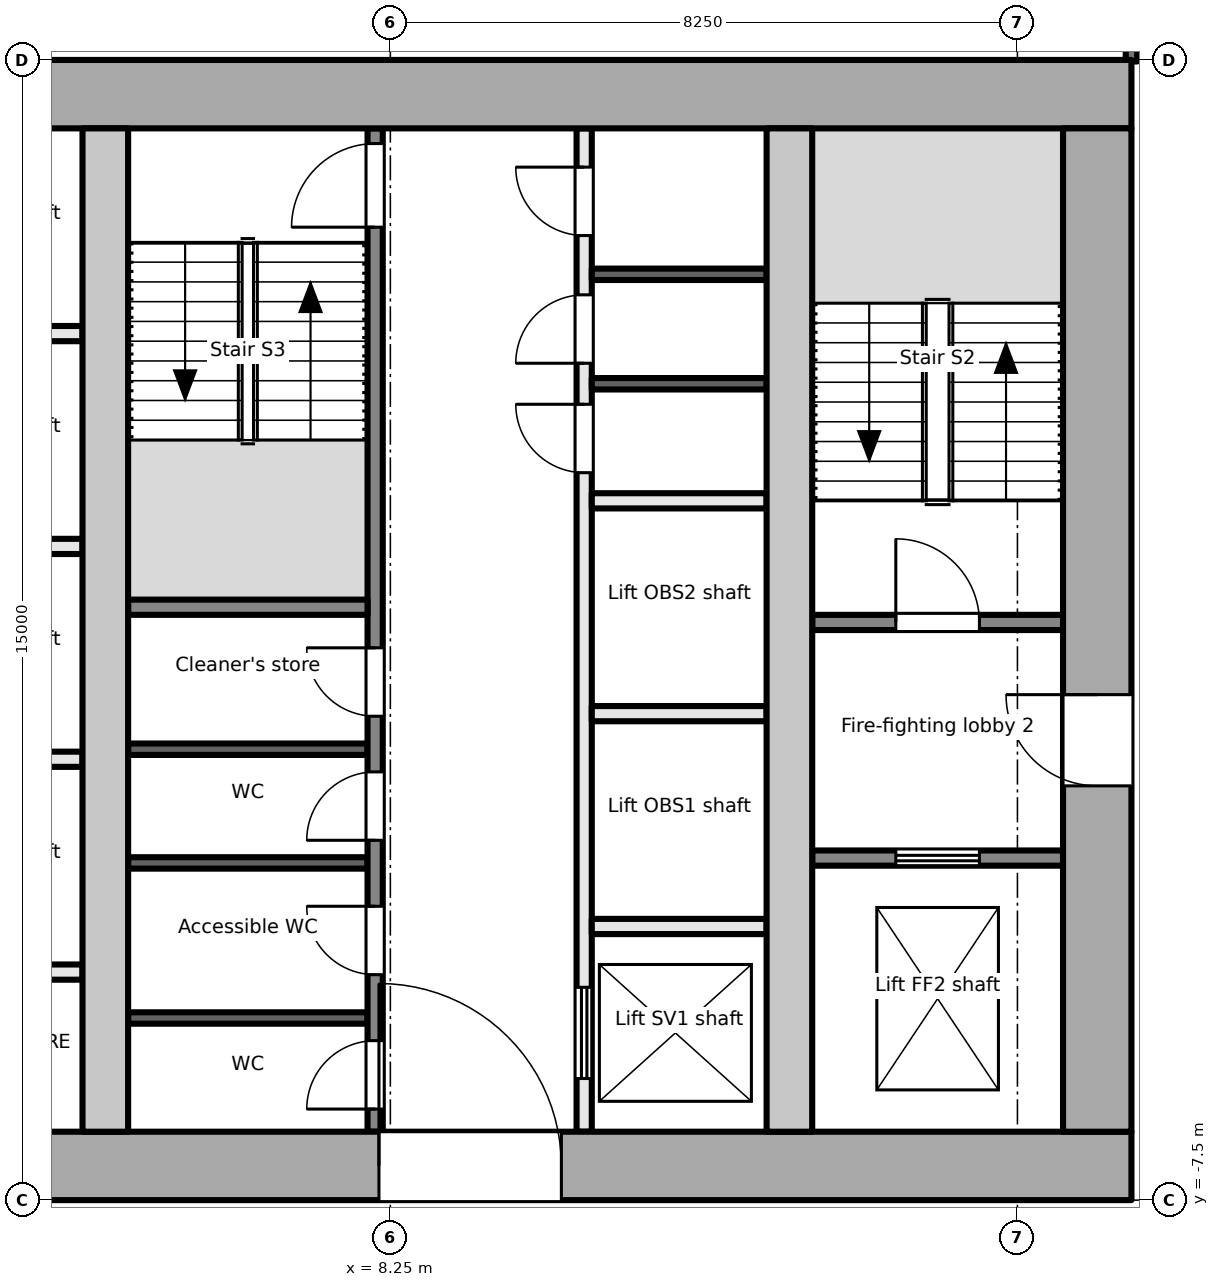
"""IFC4 building model, lengths in metres.
Left out: names, types, materials, properties, quantities, classifications, styles, units other than length and angle.
Written with IfcOpenShell. Run it as: python <this file> out.ifc"""

import sys

from ifc_helpers import new_model, si_unit, direction, frame, frame_2d, origin, place, context, subcontext, project, spatial, rectangle, extrude, element, fill, save


model = new_model("IFC4")
c1 = context("Model", 3, precision=1e-05, world=origin(), true_north=direction((0.0, 1.0)))
c2 = subcontext(c1, "Body", "Model", "MODEL_VIEW")
j1 = project(units=[si_unit("LENGTHUNIT", "METRE"), si_unit("PLANEANGLEUNIT", "RADIAN")], contexts=[c1])
p1 = place(None, origin())
s1 = spatial("IfcSite", under=j1, at=p1, CompositionType="ELEMENT")
p2 = place(p1, origin())
s2 = spatial("IfcBuilding", under=s1, at=p2, CompositionType="ELEMENT")
p3 = place(p2, frame((0.0, 0.0, 61.1)))
s3 = spatial("IfcBuildingStorey", under=s2, at=p3, CompositionType="ELEMENT", Elevation=61.1)
p4 = place(p3, frame((-18.0, -7.05, -0.2), z_axis=(0.0, 0.0, 1.0), x_axis=(1.0, 0.0, 0.0)))
e1 = element("IfcWall", 1, at=p4, inside=s3, PredefinedType="SHEAR", context=c2, shape_type="SweptSolid", body=[
    extrude(rectangle(XDim=36.0, YDim=0.9, at=frame_2d((18.0, 0.0))), origin(), (0.0, 0.0, 1.0), 4.1),
])
p5 = place(p4, frame((7.8, 0.0, 0.2)))
e2 = element("IfcOpeningElement", 2, at=p5, cuts=e1, PredefinedType="OPENING", context=c2, shape_type="SweptSolid", body=[
    extrude(rectangle(XDim=2.4, YDim=2.1, at=frame_2d((1.2, 1.05))), frame((0.0, 0.46, 0.0), z_axis=(0.0, -1.0, 0.0), x_axis=(1.0, 0.0, 0.0)), (0.0, 0.0, 1.0), 0.921),
])
p6 = place(p4, frame((17.4, 0.0, 0.2)))
e3 = element("IfcOpeningElement", 3, at=p6, cuts=e1, PredefinedType="OPENING", context=c2, shape_type="SweptSolid", body=[
    extrude(rectangle(XDim=1.2, YDim=2.1, at=frame_2d((0.6, 1.05))), frame((0.0, 0.46, 0.0), z_axis=(0.0, -1.0, 0.0), x_axis=(1.0, 0.0, 0.0)), (0.0, 0.0, 1.0), 0.921),
])
p7 = place(p4, frame((26.1, 0.0, 0.2)))
e4 = element("IfcOpeningElement", 4, at=p7, cuts=e1, PredefinedType="OPENING", context=c2, shape_type="SweptSolid", body=[
    extrude(rectangle(XDim=2.4, YDim=2.1, at=frame_2d((1.2, 1.05))), frame((0.0, 0.46, 0.0), z_axis=(0.0, -1.0, 0.0), x_axis=(1.0, 0.0, 0.0)), (0.0, 0.0, 1.0), 0.921),
])
p8 = place(p3, frame((-18.0, 7.05, -0.2), z_axis=(0.0, 0.0, 1.0), x_axis=(1.0, 0.0, 0.0)))
e5 = element("IfcWall", 5, at=p8, inside=s3, PredefinedType="SHEAR", context=c2, shape_type="SweptSolid", body=[
    extrude(rectangle(XDim=36.0, YDim=0.9, at=frame_2d((18.0, 0.0))), origin(), (0.0, 0.0, 1.0), 4.1),
])
p9 = place(p3, frame((17.55, -6.6, -0.2), z_axis=(0.0, 0.0, 1.0), x_axis=(0.0, 1.0, 0.0)))
e6 = element("IfcWall", 6, at=p9, inside=s3, PredefinedType="SHEAR", context=c2, shape_type="SweptSolid", body=[
    extrude(rectangle(XDim=13.2, YDim=0.9, at=frame_2d((6.6, 0.0))), origin(), (0.0, 0.0, 1.0), 4.1),
])
p10 = place(p9, frame((4.55, 0.0, 0.2)))
e7 = element("IfcOpeningElement", 7, at=p10, cuts=e6, PredefinedType="OPENING", context=c2, shape_type="SweptSolid", body=[
    extrude(rectangle(XDim=1.2, YDim=2.1, at=frame_2d((0.6, 1.05))), frame((0.0, 0.46, 0.0), z_axis=(0.0, -1.0, 0.0), x_axis=(1.0, 0.0, 0.0)), (0.0, 0.0, 1.0), 0.921),
])
for number, where, z_axis, x_axis in (
    (8, (4.5, -6.6, -0.2), (0.0, 0.0, 1.0), (0.0, 1.0, 0.0)),
    (9, (13.5, -6.6, -0.2), (0.0, 0.0, 1.0), (0.0, 1.0, 0.0)),
):
    element("IfcWall", number, at=place(p3, frame(where, z_axis=z_axis, x_axis=x_axis)), inside=s3, PredefinedType="SHEAR", context=c2, shape_type="SweptSolid", body=[
        extrude(rectangle(XDim=13.2, YDim=0.6, at=frame_2d((6.6, 0.0))), origin(), (0.0, 0.0, 1.0), 4.1),
    ])
p11 = place(p3, frame((13.8, -3.0, 0.0), z_axis=(0.0, 0.0, 1.0), x_axis=(1.0, 0.0, 0.0)))
e10 = element("IfcWall", 10, at=p11, inside=s3, PredefinedType="PARTITIONING", context=c2, shape_type="SweptSolid", body=[
    extrude(rectangle(XDim=3.3, YDim=0.2, at=frame_2d((1.65, 0.0))), origin(), (0.0, 0.0, 1.0), 3.9),
])
p12 = place(p11, frame((1.1, 0.0, 0.0)))
e11 = element("IfcOpeningElement", 11, at=p12, cuts=e10, PredefinedType="OPENING", context=c2, shape_type="SweptSolid", body=[
    extrude(rectangle(XDim=1.1, YDim=2.1, at=frame_2d((0.55, 1.05))), frame((0.0, 0.111, 0.0), z_axis=(0.0, -1.0, 0.0), x_axis=(1.0, 0.0, 0.0)), (0.0, 0.0, 1.0), 0.221),
])
p13 = place(p3, frame((13.8, 0.1, 0.0), z_axis=(0.0, 0.0, 1.0), x_axis=(1.0, 0.0, 0.0)))
e12 = element("IfcWall", 12, at=p13, inside=s3, PredefinedType="PARTITIONING", context=c2, shape_type="SweptSolid", body=[
    extrude(rectangle(XDim=3.3, YDim=0.2, at=frame_2d((1.65, 0.0))), origin(), (0.0, 0.0, 1.0), 3.9),
])
p14 = place(p13, frame((1.1, 0.0, 0.0)))
e13 = element("IfcOpeningElement", 13, at=p14, cuts=e12, PredefinedType="OPENING", context=c2, shape_type="SweptSolid", body=[
    extrude(rectangle(XDim=1.1, YDim=2.1, at=frame_2d((0.55, 1.05))), frame((0.0, 0.111, 0.0), z_axis=(0.0, -1.0, 0.0), x_axis=(1.0, 0.0, 0.0)), (0.0, 0.0, 1.0), 0.221),
])
for number, where, z_axis, x_axis in (
    (14, (1.9, -1.7, 0.0), (0.0, 0.0, 1.0), (1.0, 0.0, 0.0)),
    (15, (1.9, 1.1, 0.0), (0.0, 0.0, 1.0), (1.0, 0.0, 0.0)),
    (16, (1.9, 3.9, 0.0), (0.0, 0.0, 1.0), (1.0, 0.0, 0.0)),
    (17, (1.9, -4.5, 0.0), (0.0, 0.0, 1.0), (1.0, 0.0, 0.0)),
):
    element("IfcWall", number, at=place(p3, frame(where, z_axis=z_axis, x_axis=x_axis)), inside=s3, PredefinedType="PARTITIONING", context=c2, shape_type="SweptSolid", body=[
        extrude(rectangle(XDim=2.3, YDim=0.2, at=frame_2d((1.15, 0.0))), origin(), (0.0, 0.0, 1.0), 3.9),
    ])
p15 = place(p3, frame((8.05, -6.6, 0.0), z_axis=(0.0, 0.0, 1.0), x_axis=(0.0, 1.0, 0.0)))
e18 = element("IfcWall", 18, at=p15, inside=s3, PredefinedType="PARTITIONING", context=c2, shape_type="SweptSolid", body=[
    extrude(rectangle(XDim=13.2, YDim=0.2, at=frame_2d((6.6, 0.0))), origin(), (0.0, 0.0, 1.0), 3.9),
])
p16 = place(p15, frame((0.298, 0.0, 0.0)))
e19 = element("IfcOpeningElement", 19, at=p16, cuts=e18, PredefinedType="OPENING", context=c2, shape_type="SweptSolid", body=[
    extrude(rectangle(XDim=0.9, YDim=2.1, at=frame_2d((0.45, 1.05))), frame((0.0, 0.111, 0.0), z_axis=(0.0, -1.0, 0.0), x_axis=(1.0, 0.0, 0.0)), (0.0, 0.0, 1.0), 0.221),
])
p17 = place(p15, frame((2.066, 0.0, 0.0)))
e20 = element("IfcOpeningElement", 20, at=p17, cuts=e18, PredefinedType="OPENING", context=c2, shape_type="SweptSolid", body=[
    extrude(rectangle(XDim=0.9, YDim=2.1, at=frame_2d((0.45, 1.05))), frame((0.0, 0.111, 0.0), z_axis=(0.0, -1.0, 0.0), x_axis=(1.0, 0.0, 0.0)), (0.0, 0.0, 1.0), 0.221),
])
p18 = place(p15, frame((3.834, 0.0, 0.0)))
e21 = element("IfcOpeningElement", 21, at=p18, cuts=e18, PredefinedType="OPENING", context=c2, shape_type="SweptSolid", body=[
    extrude(rectangle(XDim=0.9, YDim=2.1, at=frame_2d((0.45, 1.05))), frame((0.0, 0.111, 0.0), z_axis=(0.0, -1.0, 0.0), x_axis=(1.0, 0.0, 0.0)), (0.0, 0.0, 1.0), 0.221),
])
p19 = place(p15, frame((5.466, 0.0, 0.0)))
e22 = element("IfcOpeningElement", 22, at=p19, cuts=e18, PredefinedType="OPENING", context=c2, shape_type="SweptSolid", body=[
    extrude(rectangle(XDim=0.9, YDim=2.1, at=frame_2d((0.45, 1.05))), frame((0.0, 0.111, 0.0), z_axis=(0.0, -1.0, 0.0), x_axis=(1.0, 0.0, 0.0)), (0.0, 0.0, 1.0), 0.221),
])
p20 = place(p15, frame((11.9, 0.0, 0.0)))
e23 = element("IfcOpeningElement", 23, at=p20, cuts=e18, PredefinedType="OPENING", context=c2, shape_type="SweptSolid", body=[
    extrude(rectangle(XDim=1.1, YDim=2.1, at=frame_2d((0.55, 1.05))), frame((0.0, 0.111, 0.0), z_axis=(0.0, -1.0, 0.0), x_axis=(1.0, 0.0, 0.0)), (0.0, 0.0, 1.0), 0.221),
])
p21 = place(p3, frame((10.8, -6.6, 0.0), z_axis=(0.0, 0.0, 1.0), x_axis=(0.0, 1.0, 0.0)))
e24 = element("IfcWall", 24, at=p21, inside=s3, PredefinedType="PARTITIONING", context=c2, shape_type="SweptSolid", body=[
    extrude(rectangle(XDim=13.2, YDim=0.2, at=frame_2d((6.6, 0.0))), origin(), (0.0, 0.0, 1.0), 3.9),
])
p22 = place(p21, frame((0.7, 0.0, 0.0)))
e25 = element("IfcOpeningElement", 25, at=p22, cuts=e24, PredefinedType="OPENING", context=c2, shape_type="SweptSolid", body=[
    extrude(rectangle(XDim=1.2, YDim=2.1, at=frame_2d((0.6, 1.05))), frame((0.0, 0.111, 0.0), z_axis=(0.0, -1.0, 0.0), x_axis=(1.0, 0.0, 0.0)), (0.0, 0.0, 1.0), 0.221),
])
p23 = place(p21, frame((8.67, 0.0, 0.0)))
e26 = element("IfcOpeningElement", 26, at=p23, cuts=e24, PredefinedType="OPENING", context=c2, shape_type="SweptSolid", body=[
    extrude(rectangle(XDim=0.9, YDim=2.1, at=frame_2d((0.45, 1.05))), frame((0.0, 0.111, 0.0), z_axis=(0.0, -1.0, 0.0), x_axis=(1.0, 0.0, 0.0)), (0.0, 0.0, 1.0), 0.221),
])
p24 = place(p21, frame((10.11, 0.0, 0.0)))
e27 = element("IfcOpeningElement", 27, at=p24, cuts=e24, PredefinedType="OPENING", context=c2, shape_type="SweptSolid", body=[
    extrude(rectangle(XDim=0.9, YDim=2.1, at=frame_2d((0.45, 1.05))), frame((0.0, 0.111, 0.0), z_axis=(0.0, -1.0, 0.0), x_axis=(1.0, 0.0, 0.0)), (0.0, 0.0, 1.0), 0.221),
])
p25 = place(p21, frame((11.79, 0.0, 0.0)))
e28 = element("IfcOpeningElement", 28, at=p25, cuts=e24, PredefinedType="OPENING", context=c2, shape_type="SweptSolid", body=[
    extrude(rectangle(XDim=0.9, YDim=2.1, at=frame_2d((0.45, 1.05))), frame((0.0, 0.111, 0.0), z_axis=(0.0, -1.0, 0.0), x_axis=(1.0, 0.0, 0.0)), (0.0, 0.0, 1.0), 0.221),
])
p26 = place(p3, frame((4.8, 0.3, 0.0), z_axis=(0.0, 0.0, 1.0), x_axis=(1.0, 0.0, 0.0)))
e29 = element("IfcWall", 29, at=p26, inside=s3, PredefinedType="PARTITIONING", context=c2, shape_type="SweptSolid", body=[
    extrude(rectangle(XDim=3.15, YDim=0.2, at=frame_2d((1.575, 0.0))), origin(), (0.0, 0.0, 1.0), 3.9),
])
for number, where, z_axis, x_axis in (
    (30, (4.8, -5.104, 0.0), (0.0, 0.0, 1.0), (1.0, 0.0, 0.0)),
    (31, (4.8, -3.064, 0.0), (0.0, 0.0, 1.0), (1.0, 0.0, 0.0)),
    (32, (4.8, -1.568, 0.0), (0.0, 0.0, 1.0), (1.0, 0.0, 0.0)),
):
    element("IfcWall", number, at=place(p3, frame(where, z_axis=z_axis, x_axis=x_axis)), inside=s3, PredefinedType="PARTITIONING", context=c2, shape_type="SweptSolid", body=[
        extrude(rectangle(XDim=3.15, YDim=0.15, at=frame_2d((1.575, 0.0))), origin(), (0.0, 0.0, 1.0), 3.9),
    ])
for number, where, z_axis, x_axis in (
    (33, (10.9, -3.9, 0.0), (0.0, 0.0, 1.0), (1.0, 0.0, 0.0)),
    (34, (10.9, -1.1, 0.0), (0.0, 0.0, 1.0), (1.0, 0.0, 0.0)),
    (35, (10.9, 1.7, 0.0), (0.0, 0.0, 1.0), (1.0, 0.0, 0.0)),
):
    element("IfcWall", number, at=place(p3, frame(where, z_axis=z_axis, x_axis=x_axis)), inside=s3, PredefinedType="PARTITIONING", context=c2, shape_type="SweptSolid", body=[
        extrude(rectangle(XDim=2.3, YDim=0.2, at=frame_2d((1.15, 0.0))), origin(), (0.0, 0.0, 1.0), 3.9),
    ])
for number, where, z_axis, x_axis in (
    (36, (10.9, 3.24, 0.0), (0.0, 0.0, 1.0), (1.0, 0.0, 0.0)),
    (37, (10.9, 4.68, 0.0), (0.0, 0.0, 1.0), (1.0, 0.0, 0.0)),
):
    element("IfcWall", number, at=place(p3, frame(where, z_axis=z_axis, x_axis=x_axis)), inside=s3, PredefinedType="PARTITIONING", context=c2, shape_type="SweptSolid", body=[
        extrude(rectangle(XDim=2.3, YDim=0.15, at=frame_2d((1.15, 0.0))), origin(), (0.0, 0.0, 1.0), 3.9),
    ])
p27 = place(p3, frame((18.0, 7.48, 0.0), z_axis=(0.0, 0.0, 1.0), x_axis=(0.0, 1.0, 0.0)))
e38 = element("IfcWall", 38, at=p27, inside=s3, PredefinedType="PARTITIONING", context=c2, shape_type="SweptSolid", body=[
    extrude(rectangle(XDim=2.26, YDim=0.15, at=frame_2d((1.13, 0.0))), origin(), (0.0, 0.0, 1.0), 2.9),
])
p28 = place(p12, origin())
e39 = element("IfcDoor", 39, at=p28, inside=s3, OperationType="DOUBLE_DOOR_SLIDING", PredefinedType="DOOR", context=c2, shape_type="SweptSolid", body=[
    extrude(rectangle(XDim=1.1, YDim=2.1, at=frame_2d((0.55, 1.05))), frame((0.0, 0.025, 0.0), z_axis=(0.0, -1.0, 0.0), x_axis=(1.0, 0.0, 0.0)), (0.0, 0.0, 1.0), 0.05),
])
fill(e11, e39)
p29 = place(p10, origin())
e40 = element("IfcDoor", 40, at=p29, inside=s3, OperationType="SINGLE_SWING_RIGHT", PredefinedType="DOOR", context=c2, shape_type="SweptSolid", body=[
    extrude(rectangle(XDim=1.2, YDim=2.1, at=frame_2d((0.6, 1.05))), frame((0.0, 0.025, 0.0), z_axis=(0.0, -1.0, 0.0), x_axis=(1.0, 0.0, 0.0)), (0.0, 0.0, 1.0), 0.05),
])
fill(e7, e40)
p30 = place(p14, origin())
e41 = element("IfcDoor", 41, at=p30, inside=s3, OperationType="SINGLE_SWING_LEFT", PredefinedType="DOOR", context=c2, shape_type="SweptSolid", body=[
    extrude(rectangle(XDim=1.1, YDim=2.1, at=frame_2d((0.55, 1.05))), frame((0.0, 0.025, 0.0), z_axis=(0.0, -1.0, 0.0), x_axis=(1.0, 0.0, 0.0)), (0.0, 0.0, 1.0), 0.05),
])
fill(e13, e41)
p31 = place(p16, origin())
e42 = element("IfcDoor", 42, at=p31, inside=s3, OperationType="SINGLE_SWING_LEFT", PredefinedType="DOOR", context=c2, shape_type="SweptSolid", body=[
    extrude(rectangle(XDim=0.9, YDim=2.1, at=frame_2d((0.45, 1.05))), frame((0.0, 0.025, 0.0), z_axis=(0.0, -1.0, 0.0), x_axis=(1.0, 0.0, 0.0)), (0.0, 0.0, 1.0), 0.05),
])
fill(e19, e42)
p32 = place(p17, origin())
e43 = element("IfcDoor", 43, at=p32, inside=s3, OperationType="SINGLE_SWING_RIGHT", PredefinedType="DOOR", context=c2, shape_type="SweptSolid", body=[
    extrude(rectangle(XDim=0.9, YDim=2.1, at=frame_2d((0.45, 1.05))), frame((0.0, 0.025, 0.0), z_axis=(0.0, -1.0, 0.0), x_axis=(1.0, 0.0, 0.0)), (0.0, 0.0, 1.0), 0.05),
])
fill(e20, e43)
p33 = place(p18, origin())
e44 = element("IfcDoor", 44, at=p33, inside=s3, OperationType="SINGLE_SWING_LEFT", PredefinedType="DOOR", context=c2, shape_type="SweptSolid", body=[
    extrude(rectangle(XDim=0.9, YDim=2.1, at=frame_2d((0.45, 1.05))), frame((0.0, 0.025, 0.0), z_axis=(0.0, -1.0, 0.0), x_axis=(1.0, 0.0, 0.0)), (0.0, 0.0, 1.0), 0.05),
])
fill(e21, e44)
p34 = place(p19, origin())
e45 = element("IfcDoor", 45, at=p34, inside=s3, OperationType="SINGLE_SWING_RIGHT", PredefinedType="DOOR", context=c2, shape_type="SweptSolid", body=[
    extrude(rectangle(XDim=0.9, YDim=2.1, at=frame_2d((0.45, 1.05))), frame((0.0, 0.025, 0.0), z_axis=(0.0, -1.0, 0.0), x_axis=(1.0, 0.0, 0.0)), (0.0, 0.0, 1.0), 0.05),
])
fill(e22, e45)
p35 = place(p20, origin())
e46 = element("IfcDoor", 46, at=p35, inside=s3, OperationType="SINGLE_SWING_LEFT", PredefinedType="DOOR", context=c2, shape_type="SweptSolid", body=[
    extrude(rectangle(XDim=1.1, YDim=2.1, at=frame_2d((0.55, 1.05))), frame((0.0, 0.025, 0.0), z_axis=(0.0, -1.0, 0.0), x_axis=(1.0, 0.0, 0.0)), (0.0, 0.0, 1.0), 0.05),
])
fill(e23, e46)
p36 = place(p7, origin())
e47 = element("IfcDoor", 47, at=p36, inside=s3, OperationType="DOUBLE_DOOR_DOUBLE_SWING", PredefinedType="DOOR", context=c2, shape_type="SweptSolid", body=[
    extrude(rectangle(XDim=2.4, YDim=2.1, at=frame_2d((1.2, 1.05))), frame((0.0, 0.025, 0.0), z_axis=(0.0, -1.0, 0.0), x_axis=(1.0, 0.0, 0.0)), (0.0, 0.0, 1.0), 0.05),
])
fill(e4, e47)
p37 = place(p22, origin())
e48 = element("IfcDoor", 48, at=p37, inside=s3, OperationType="DOUBLE_DOOR_SLIDING", PredefinedType="DOOR", context=c2, shape_type="SweptSolid", body=[
    extrude(rectangle(XDim=1.2, YDim=2.1, at=frame_2d((0.6, 1.05))), frame((0.0, 0.025, 0.0), z_axis=(0.0, -1.0, 0.0), x_axis=(1.0, 0.0, 0.0)), (0.0, 0.0, 1.0), 0.05),
])
fill(e25, e48)
p38 = place(p23, origin())
e49 = element("IfcDoor", 49, at=p38, inside=s3, OperationType="SINGLE_SWING_RIGHT", PredefinedType="DOOR", context=c2, shape_type="SweptSolid", body=[
    extrude(rectangle(XDim=0.9, YDim=2.1, at=frame_2d((0.45, 1.05))), frame((0.0, 0.025, 0.0), z_axis=(0.0, -1.0, 0.0), x_axis=(1.0, 0.0, 0.0)), (0.0, 0.0, 1.0), 0.05),
])
fill(e26, e49)
p39 = place(p24, origin())
e50 = element("IfcDoor", 50, at=p39, inside=s3, OperationType="SINGLE_SWING_LEFT", PredefinedType="DOOR", context=c2, shape_type="SweptSolid", body=[
    extrude(rectangle(XDim=0.9, YDim=2.1, at=frame_2d((0.45, 1.05))), frame((0.0, 0.025, 0.0), z_axis=(0.0, -1.0, 0.0), x_axis=(1.0, 0.0, 0.0)), (0.0, 0.0, 1.0), 0.05),
])
fill(e27, e50)
p40 = place(p25, origin())
e51 = element("IfcDoor", 51, at=p40, inside=s3, OperationType="SINGLE_SWING_RIGHT", PredefinedType="DOOR", context=c2, shape_type="SweptSolid", body=[
    extrude(rectangle(XDim=0.9, YDim=2.1, at=frame_2d((0.45, 1.05))), frame((0.0, 0.025, 0.0), z_axis=(0.0, -1.0, 0.0), x_axis=(1.0, 0.0, 0.0)), (0.0, 0.0, 1.0), 0.05),
])
fill(e28, e51)
save(model, sys.argv[1])
